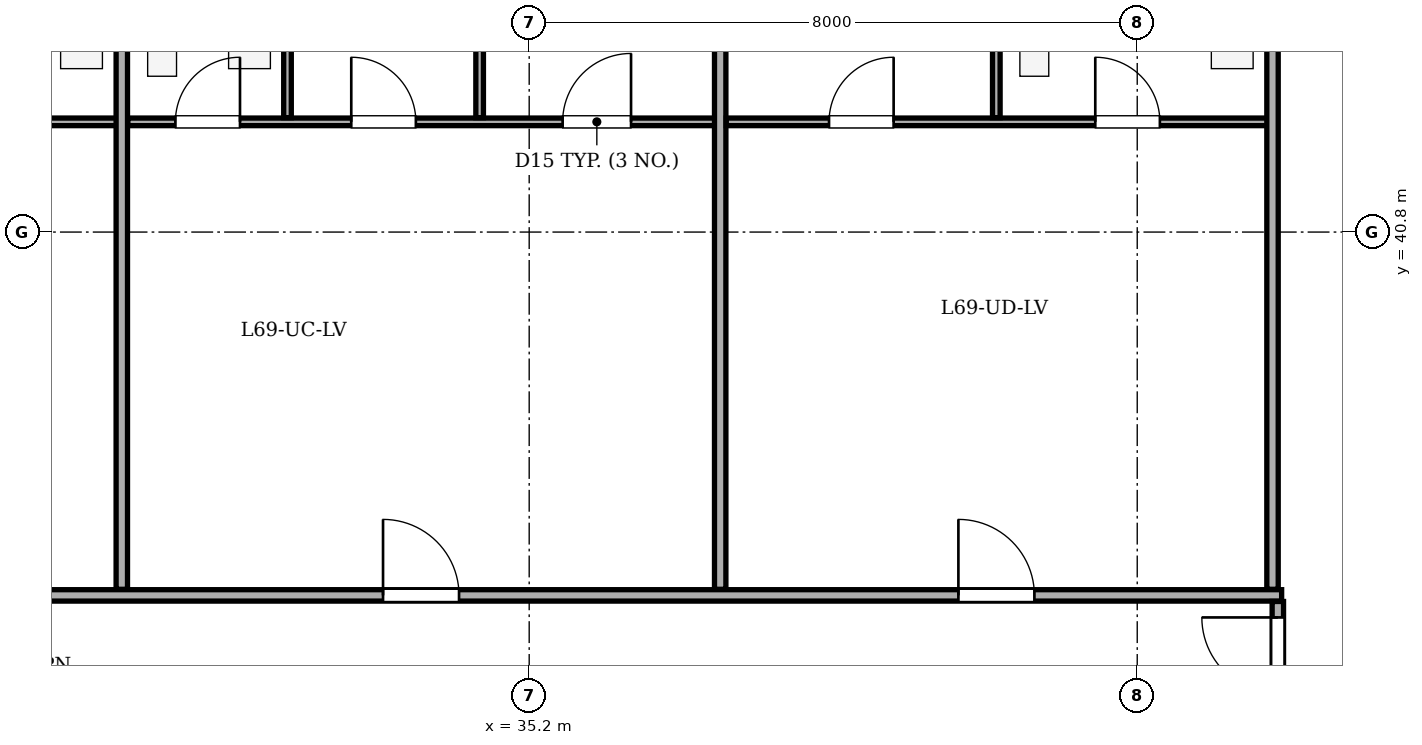
"""IFC4 building model, lengths in metres.
Left out: names, types, materials, properties, quantities, classifications, styles, units other than length and angle.
Written with IfcOpenShell. Run it as: python <this file> out.ifc"""

import sys

from ifc_helpers import new_model, si_unit, direction, frame, frame_2d, origin, place, context, subcontext, project, spatial, rectangle, extrude, element, fill, save


model = new_model("IFC4")
c1 = context("Model", 3, precision=1e-05, world=origin(), true_north=direction((0.0, 1.0)))
c2 = subcontext(c1, "Body", "Model", "MODEL_VIEW")
j1 = project(units=[si_unit("LENGTHUNIT", "METRE"), si_unit("PLANEANGLEUNIT", "RADIAN")], contexts=[c1])
p1 = place(None, origin())
s1 = spatial("IfcSite", under=j1, at=p1, CompositionType="ELEMENT")
p2 = place(p1, origin())
s2 = spatial("IfcBuilding", under=s1, at=p2, CompositionType="ELEMENT")
p3 = place(p2, frame((0.0, 0.0, 261.9)))
s3 = spatial("IfcBuildingStorey", under=s2, at=p3, CompositionType="ELEMENT", Elevation=261.9)
p4 = place(p3, frame((14.58, 36.02, 0.0), z_axis=(0.0, 0.0, 1.0), x_axis=(1.0, 0.0, 0.0)))
e1 = element("IfcWall", 1, at=p4, inside=s3, PredefinedType="PARTITIONING", context=c2, shape_type="SweptSolid", body=[
    extrude(rectangle(XDim=30.52, YDim=0.15, at=frame_2d((15.26, 0.0))), origin(), (0.0, 0.0, 1.0), 3.1),
])
p5 = place(p4, frame((3.253, 0.0, 0.0)))
e2 = element("IfcOpeningElement", 2, at=p5, cuts=e1, PredefinedType="OPENING", context=c2, shape_type="SweptSolid", body=[
    extrude(rectangle(XDim=1.0, YDim=2.1, at=frame_2d((0.5, 1.05))), frame((0.0, 0.085, 0.0), z_axis=(0.0, -1.0, 0.0), x_axis=(1.0, 0.0, 0.0)), (0.0, 0.0, 1.0), 0.17),
])
p6 = place(p4, frame((10.823, 0.0, 0.0)))
e3 = element("IfcOpeningElement", 3, at=p6, cuts=e1, PredefinedType="OPENING", context=c2, shape_type="SweptSolid", body=[
    extrude(rectangle(XDim=1.0, YDim=2.1, at=frame_2d((0.5, 1.05))), frame((0.0, 0.085, 0.0), z_axis=(0.0, -1.0, 0.0), x_axis=(1.0, 0.0, 0.0)), (0.0, 0.0, 1.0), 0.17),
])
p7 = place(p4, frame((18.697, 0.0, 0.0)))
e4 = element("IfcOpeningElement", 4, at=p7, cuts=e1, PredefinedType="OPENING", context=c2, shape_type="SweptSolid", body=[
    extrude(rectangle(XDim=1.0, YDim=2.1, at=frame_2d((0.5, 1.05))), frame((0.0, 0.085, 0.0), z_axis=(0.0, -1.0, 0.0), x_axis=(1.0, 0.0, 0.0)), (0.0, 0.0, 1.0), 0.17),
])
p8 = place(p4, frame((26.267, 0.0, 0.0)))
e5 = element("IfcOpeningElement", 5, at=p8, cuts=e1, PredefinedType="OPENING", context=c2, shape_type="SweptSolid", body=[
    extrude(rectangle(XDim=1.0, YDim=2.1, at=frame_2d((0.5, 1.05))), frame((0.0, 0.085, 0.0), z_axis=(0.0, -1.0, 0.0), x_axis=(1.0, 0.0, 0.0)), (0.0, 0.0, 1.0), 0.17),
])
p9 = place(p3, frame((22.047, 42.25, 0.0), z_axis=(0.0, 0.0, 1.0), x_axis=(1.0, 0.0, 0.0)))
e6 = element("IfcWall", 6, at=p9, inside=s3, PredefinedType="PARTITIONING", context=c2, shape_type="SweptSolid", body=[
    extrude(rectangle(XDim=7.833, YDim=0.1, at=frame_2d((3.917, 0.0))), origin(), (0.0, 0.0, 1.0), 3.1),
])
p10 = place(p9, frame((1.503, 0.0, 0.0)))
e7 = element("IfcOpeningElement", 7, at=p10, cuts=e6, PredefinedType="OPENING", context=c2, shape_type="SweptSolid", body=[
    extrude(rectangle(XDim=0.85, YDim=2.05, at=frame_2d((0.425, 1.025))), frame((0.0, 0.06, 0.0), z_axis=(0.0, -1.0, 0.0), x_axis=(1.0, 0.0, 0.0)), (0.0, 0.0, 1.0), 0.12),
])
p11 = place(p9, frame((5.31, 0.0, 0.0)))
e8 = element("IfcOpeningElement", 8, at=p11, cuts=e6, PredefinedType="OPENING", context=c2, shape_type="SweptSolid", body=[
    extrude(rectangle(XDim=0.85, YDim=2.05, at=frame_2d((0.425, 1.025))), frame((0.0, 0.06, 0.0), z_axis=(0.0, -1.0, 0.0), x_axis=(1.0, 0.0, 0.0)), (0.0, 0.0, 1.0), 0.12),
])
p12 = place(p3, frame((29.84, 36.1, 0.0), z_axis=(0.0, 0.0, 1.0), x_axis=(0.0, 1.0, 0.0)))
e9 = element("IfcWall", 9, at=p12, inside=s3, PredefinedType="PARTITIONING", context=c2, shape_type="SweptSolid", body=[
    extrude(rectangle(XDim=8.655, YDim=0.15, at=frame_2d((4.327, 0.0))), origin(), (0.0, 0.0, 1.0), 2.725),
])
p13 = place(p3, frame((29.92, 42.25, 0.0), z_axis=(0.0, 0.0, 1.0), x_axis=(1.0, 0.0, 0.0)))
e10 = element("IfcWall", 10, at=p13, inside=s3, PredefinedType="PARTITIONING", context=c2, shape_type="SweptSolid", body=[
    extrude(rectangle(XDim=7.833, YDim=0.1, at=frame_2d((3.917, 0.0))), origin(), (0.0, 0.0, 1.0), 3.1),
])
p14 = place(p13, frame((0.625, 0.0, 0.0)))
e11 = element("IfcOpeningElement", 11, at=p14, cuts=e10, PredefinedType="OPENING", context=c2, shape_type="SweptSolid", body=[
    extrude(rectangle(XDim=0.85, YDim=2.05, at=frame_2d((0.425, 1.025))), frame((0.0, 0.06, 0.0), z_axis=(0.0, -1.0, 0.0), x_axis=(1.0, 0.0, 0.0)), (0.0, 0.0, 1.0), 0.12),
])
p15 = place(p13, frame((2.939, 0.0, 0.0)))
e12 = element("IfcOpeningElement", 12, at=p15, cuts=e10, PredefinedType="OPENING", context=c2, shape_type="SweptSolid", body=[
    extrude(rectangle(XDim=0.85, YDim=2.05, at=frame_2d((0.425, 1.025))), frame((0.0, 0.06, 0.0), z_axis=(0.0, -1.0, 0.0), x_axis=(1.0, 0.0, 0.0)), (0.0, 0.0, 1.0), 0.12),
])
p16 = place(p13, frame((5.72, 0.0, 0.0)))
e13 = element("IfcOpeningElement", 13, at=p16, cuts=e10, PredefinedType="OPENING", context=c2, shape_type="SweptSolid", body=[
    extrude(rectangle(XDim=0.9, YDim=2.05, at=frame_2d((0.45, 1.025))), frame((0.0, 0.06, 0.0), z_axis=(0.0, -1.0, 0.0), x_axis=(1.0, 0.0, 0.0)), (0.0, 0.0, 1.0), 0.12),
])
for number, where, z_axis, x_axis in (
    (14, (32.02, 42.305, 0.0), (0.0, 0.0, 1.0), (0.0, 1.0, 0.0)),
    (15, (34.548, 42.305, 0.0), (0.0, 0.0, 1.0), (0.0, 1.0, 0.0)),
):
    element("IfcWall", number, at=place(p3, frame(where, z_axis=z_axis, x_axis=x_axis)), inside=s3, PredefinedType="PARTITIONING", context=c2, shape_type="SweptSolid", body=[
        extrude(rectangle(XDim=2.45, YDim=0.1, at=frame_2d((1.225, 0.0))), origin(), (0.0, 0.0, 1.0), 3.1),
    ])
p17 = place(p3, frame((37.713, 36.1, 0.0), z_axis=(0.0, 0.0, 1.0), x_axis=(0.0, 1.0, 0.0)))
e16 = element("IfcWall", 16, at=p17, inside=s3, PredefinedType="PARTITIONING", context=c2, shape_type="SweptSolid", body=[
    extrude(rectangle(XDim=8.655, YDim=0.15, at=frame_2d((4.327, 0.0))), origin(), (0.0, 0.0, 1.0), 3.1),
])
p18 = place(p3, frame((37.793, 42.25, 0.0), z_axis=(0.0, 0.0, 1.0), x_axis=(1.0, 0.0, 0.0)))
e17 = element("IfcWall", 17, at=p18, inside=s3, PredefinedType="PARTITIONING", context=c2, shape_type="SweptSolid", body=[
    extrude(rectangle(XDim=7.227, YDim=0.1, at=frame_2d((3.614, 0.0))), origin(), (0.0, 0.0, 1.0), 3.1),
])
p19 = place(p18, frame((1.352, 0.0, 0.0)))
e18 = element("IfcOpeningElement", 18, at=p19, cuts=e17, PredefinedType="OPENING", context=c2, shape_type="SweptSolid", body=[
    extrude(rectangle(XDim=0.85, YDim=2.05, at=frame_2d((0.425, 1.025))), frame((0.0, 0.06, 0.0), z_axis=(0.0, -1.0, 0.0), x_axis=(1.0, 0.0, 0.0)), (0.0, 0.0, 1.0), 0.12),
])
p20 = place(p18, frame((4.855, 0.0, 0.0)))
e19 = element("IfcOpeningElement", 19, at=p20, cuts=e17, PredefinedType="OPENING", context=c2, shape_type="SweptSolid", body=[
    extrude(rectangle(XDim=0.85, YDim=2.05, at=frame_2d((0.425, 1.025))), frame((0.0, 0.06, 0.0), z_axis=(0.0, -1.0, 0.0), x_axis=(1.0, 0.0, 0.0)), (0.0, 0.0, 1.0), 0.12),
])
p21 = place(p3, frame((41.346, 42.305, 0.0), z_axis=(0.0, 0.0, 1.0), x_axis=(0.0, 1.0, 0.0)))
e20 = element("IfcWall", 20, at=p21, inside=s3, PredefinedType="PARTITIONING", context=c2, shape_type="SweptSolid", body=[
    extrude(rectangle(XDim=2.45, YDim=0.1, at=frame_2d((1.225, 0.0))), origin(), (0.0, 0.0, 1.0), 3.1),
])
p22 = place(p3, frame((44.98, 36.1, 0.0), z_axis=(0.0, 0.0, 1.0), x_axis=(0.0, 1.0, 0.0)))
e21 = element("IfcWall", 21, at=p22, inside=s3, PredefinedType="PARTITIONING", context=c2, shape_type="SweptSolid", body=[
    extrude(rectangle(XDim=8.655, YDim=0.15, at=frame_2d((4.327, 0.0))), origin(), (0.0, 0.0, 1.0), 2.725),
])
p23 = place(p3, frame((45.05, 34.15, 0.0), z_axis=(0.0, 0.0, 1.0), x_axis=(0.0, 1.0, 0.0)))
e22 = element("IfcWall", 22, at=p23, inside=s3, PredefinedType="PARTITIONING", context=c2, shape_type="SweptSolid", body=[
    extrude(rectangle(XDim=1.79, YDim=0.15, at=frame_2d((0.895, 0.0))), origin(), (0.0, 0.0, 1.0), 2.725),
])
p24 = place(p23, frame((0.58, 0.0, 0.0)))
e23 = element("IfcOpeningElement", 23, at=p24, cuts=e22, PredefinedType="OPENING", context=c2, shape_type="SweptSolid", body=[
    extrude(rectangle(XDim=1.0, YDim=2.1, at=frame_2d((0.5, 1.05))), frame((0.0, 0.085, 0.0), z_axis=(0.0, -1.0, 0.0), x_axis=(1.0, 0.0, 0.0)), (0.0, 0.0, 1.0), 0.17),
])
p25 = place(p7, origin())
e24 = element("IfcDoor", 24, at=p25, inside=s3, OperationType="SINGLE_SWING_LEFT", PredefinedType="DOOR", context=c2, shape_type="SweptSolid", body=[
    extrude(rectangle(XDim=1.0, YDim=2.1, at=frame_2d((0.5, 1.05))), frame((0.0, 0.025, 0.0), z_axis=(0.0, -1.0, 0.0), x_axis=(1.0, 0.0, 0.0)), (0.0, 0.0, 1.0), 0.05),
])
fill(e4, e24)
p26 = place(p8, origin())
e25 = element("IfcDoor", 25, at=p26, inside=s3, OperationType="SINGLE_SWING_LEFT", PredefinedType="DOOR", context=c2, shape_type="SweptSolid", body=[
    extrude(rectangle(XDim=1.0, YDim=2.1, at=frame_2d((0.5, 1.05))), frame((0.0, 0.025, 0.0), z_axis=(0.0, -1.0, 0.0), x_axis=(1.0, 0.0, 0.0)), (0.0, 0.0, 1.0), 0.05),
])
fill(e5, e25)
p27 = place(p14, origin())
e26 = element("IfcDoor", 26, at=p27, inside=s3, OperationType="SINGLE_SWING_RIGHT", PredefinedType="DOOR", context=c2, shape_type="SweptSolid", body=[
    extrude(rectangle(XDim=0.85, YDim=2.05, at=frame_2d((0.425, 1.025))), frame((0.0, 0.025, 0.0), z_axis=(0.0, -1.0, 0.0), x_axis=(1.0, 0.0, 0.0)), (0.0, 0.0, 1.0), 0.05),
])
fill(e11, e26)
p28 = place(p15, origin())
e27 = element("IfcDoor", 27, at=p28, inside=s3, OperationType="SINGLE_SWING_LEFT", PredefinedType="DOOR", context=c2, shape_type="SweptSolid", body=[
    extrude(rectangle(XDim=0.85, YDim=2.05, at=frame_2d((0.425, 1.025))), frame((0.0, 0.025, 0.0), z_axis=(0.0, -1.0, 0.0), x_axis=(1.0, 0.0, 0.0)), (0.0, 0.0, 1.0), 0.05),
])
fill(e12, e27)
p29 = place(p16, origin())
e28 = element("IfcDoor", 28, at=p29, inside=s3, OperationType="SINGLE_SWING_RIGHT", PredefinedType="DOOR", context=c2, shape_type="SweptSolid", body=[
    extrude(rectangle(XDim=0.9, YDim=2.05, at=frame_2d((0.45, 1.025))), frame((0.0, 0.025, 0.0), z_axis=(0.0, -1.0, 0.0), x_axis=(1.0, 0.0, 0.0)), (0.0, 0.0, 1.0), 0.05),
])
fill(e13, e28)
p30 = place(p19, origin())
e29 = element("IfcDoor", 29, at=p30, inside=s3, OperationType="SINGLE_SWING_RIGHT", PredefinedType="DOOR", context=c2, shape_type="SweptSolid", body=[
    extrude(rectangle(XDim=0.85, YDim=2.05, at=frame_2d((0.425, 1.025))), frame((0.0, 0.025, 0.0), z_axis=(0.0, -1.0, 0.0), x_axis=(1.0, 0.0, 0.0)), (0.0, 0.0, 1.0), 0.05),
])
fill(e18, e29)
p31 = place(p20, origin())
e30 = element("IfcDoor", 30, at=p31, inside=s3, OperationType="SINGLE_SWING_LEFT", PredefinedType="DOOR", context=c2, shape_type="SweptSolid", body=[
    extrude(rectangle(XDim=0.85, YDim=2.05, at=frame_2d((0.425, 1.025))), frame((0.0, 0.025, 0.0), z_axis=(0.0, -1.0, 0.0), x_axis=(1.0, 0.0, 0.0)), (0.0, 0.0, 1.0), 0.05),
])
fill(e19, e30)
p32 = place(p24, origin())
e31 = element("IfcDoor", 31, at=p32, inside=s3, OperationType="SINGLE_SWING_RIGHT", PredefinedType="DOOR", context=c2, shape_type="SweptSolid", body=[
    extrude(rectangle(XDim=1.0, YDim=2.1, at=frame_2d((0.5, 1.05))), frame((0.0, 0.025, 0.0), z_axis=(0.0, -1.0, 0.0), x_axis=(1.0, 0.0, 0.0)), (0.0, 0.0, 1.0), 0.05),
])
fill(e23, e31)
save(model, sys.argv[1])
